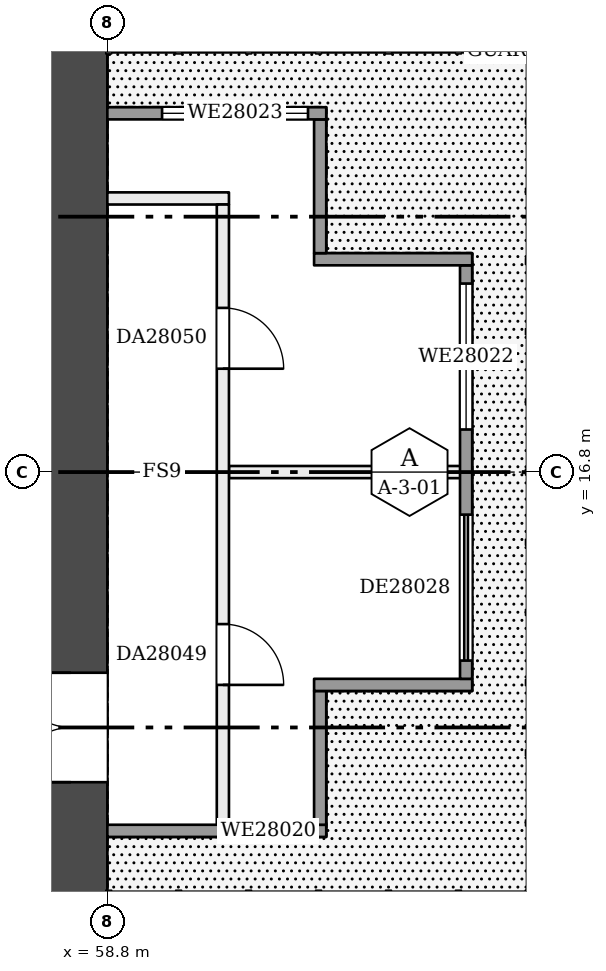
"""IFC4 building model, lengths in metres.
Left out: names, types, materials, properties, quantities, classifications, styles, units other than length and angle.
Written with IfcOpenShell. Run it as: python <this file> out.ifc"""

import sys

from ifc_helpers import new_model, si_unit, direction, frame, frame_2d, origin, place, context, subcontext, project, spatial, rectangle, extrude, element, fill, save


model = new_model("IFC4")
c1 = context("Model", 3, precision=1e-05, world=origin(), true_north=direction((0.0, 1.0)))
c2 = subcontext(c1, "Body", "Model", "MODEL_VIEW")
j1 = project(units=[si_unit("LENGTHUNIT", "METRE"), si_unit("PLANEANGLEUNIT", "RADIAN")], contexts=[c1])
p1 = place(None, origin())
s1 = spatial("IfcSite", under=j1, at=p1, CompositionType="ELEMENT")
p2 = place(p1, origin())
s2 = spatial("IfcBuilding", under=s1, at=p2, CompositionType="ELEMENT")
p3 = place(p2, frame((0.0, 0.0, 112.7)))
s3 = spatial("IfcBuildingStorey", under=s2, at=p3, CompositionType="ELEMENT", Elevation=112.7)
p4 = place(p3, frame((58.2, 9.6, 0.0), z_axis=(0.0, 0.0, 1.0), x_axis=(0.0, 1.0, 0.0)))
e1 = element("IfcWall", 1, at=p4, inside=s3, PredefinedType="SHEAR", context=c2, shape_type="SweptSolid", body=[
    extrude(rectangle(XDim=14.4, YDim=1.2, at=frame_2d((7.2, 0.0))), origin(), (0.0, 0.0, 1.0), 3.22),
])
p5 = place(p4, frame((2.1, 0.0, 0.0)))
e2 = element("IfcOpeningElement", 2, at=p5, cuts=e1, PredefinedType="OPENING", context=c2, shape_type="SweptSolid", body=[
    extrude(rectangle(XDim=1.8, YDim=2.1, at=frame_2d((0.9, 1.05))), frame((0.0, 0.61, 0.0), z_axis=(0.0, -1.0, 0.0), x_axis=(1.0, 0.0, 0.0)), (0.0, 0.0, 1.0), 1.22),
])
p6 = place(p3, frame((60.8, 16.8, 0.0), z_axis=(0.0, 0.0, 1.0), x_axis=(1.0, 0.0, 0.0)))
e3 = element("IfcWall", 3, at=p6, inside=s3, PredefinedType="PARTITIONING", context=c2, shape_type="SweptSolid", body=[
    extrude(rectangle(XDim=3.9, YDim=0.2, at=frame_2d((1.95, 0.0))), origin(), (0.0, 0.0, 1.0), 3.22),
])
p7 = place(p3, frame((58.8, 21.3, 0.0), z_axis=(0.0, 0.0, 1.0), x_axis=(1.0, 0.0, 0.0)))
e4 = element("IfcWall", 4, at=p7, inside=s3, PredefinedType="PARTITIONING", context=c2, shape_type="SweptSolid", body=[
    extrude(rectangle(XDim=2.0, YDim=0.2, at=frame_2d((1.0, 0.0))), origin(), (0.0, 0.0, 1.0), 3.22),
])
p8 = place(p3, frame((60.7, 10.9, 0.0), z_axis=(0.0, 0.0, 1.0), x_axis=(0.0, 1.0, 0.0)))
e5 = element("IfcWall", 5, at=p8, inside=s3, PredefinedType="PARTITIONING", context=c2, shape_type="SweptSolid", body=[
    extrude(rectangle(XDim=10.3, YDim=0.2, at=frame_2d((5.15, 0.0))), origin(), (0.0, 0.0, 1.0), 3.22),
])
p9 = place(p8, frame((2.4, 0.0, 0.0)))
e6 = element("IfcOpeningElement", 6, at=p9, cuts=e5, PredefinedType="OPENING", context=c2, shape_type="SweptSolid", body=[
    extrude(rectangle(XDim=1.0, YDim=2.1, at=frame_2d((0.5, 1.05))), frame((0.0, 0.11, 0.0), z_axis=(0.0, -1.0, 0.0), x_axis=(1.0, 0.0, 0.0)), (0.0, 0.0, 1.0), 0.22),
])
p10 = place(p8, frame((7.6, 0.0, 0.0)))
e7 = element("IfcOpeningElement", 7, at=p10, cuts=e5, PredefinedType="OPENING", context=c2, shape_type="SweptSolid", body=[
    extrude(rectangle(XDim=1.0, YDim=2.1, at=frame_2d((0.5, 1.05))), frame((0.0, 0.11, 0.0), z_axis=(0.0, -1.0, 0.0), x_axis=(1.0, 0.0, 0.0)), (0.0, 0.0, 1.0), 0.22),
])
p11 = place(p3, frame((58.8, 10.9, 0.0), z_axis=(0.0, 0.0, 1.0), x_axis=(1.0, 0.0, 0.0)))
e8 = element("IfcWall", 8, at=p11, inside=s3, PredefinedType="SOLIDWALL", context=c2, shape_type="SweptSolid", body=[
    extrude(rectangle(XDim=3.6, YDim=0.2, at=frame_2d((1.8, 0.0))), origin(), (0.0, 0.0, 1.0), 3.22),
])
p12 = place(p11, frame((2.0, 0.0, 0.9)))
e9 = element("IfcOpeningElement", 9, at=p12, cuts=e8, PredefinedType="OPENING", context=c2, shape_type="SweptSolid", body=[
    extrude(rectangle(XDim=1.3, YDim=1.5, at=frame_2d((0.65, 0.75))), frame((0.0, 0.11, 0.0), z_axis=(0.0, -1.0, 0.0), x_axis=(1.0, 0.0, 0.0)), (0.0, 0.0, 1.0), 0.22),
])
p13 = place(p3, frame((62.3, 11.0, 0.0), z_axis=(0.0, 0.0, 1.0), x_axis=(0.0, 1.0, 0.0)))
e10 = element("IfcWall", 10, at=p13, inside=s3, PredefinedType="SOLIDWALL", context=c2, shape_type="SweptSolid", body=[
    extrude(rectangle(XDim=2.2, YDim=0.2, at=frame_2d((1.1, 0.0))), origin(), (0.0, 0.0, 1.0), 3.22),
])
p14 = place(p3, frame((62.2, 13.3, 0.0), z_axis=(0.0, 0.0, 1.0), x_axis=(1.0, 0.0, 0.0)))
e11 = element("IfcWall", 11, at=p14, inside=s3, PredefinedType="SOLIDWALL", context=c2, shape_type="SweptSolid", body=[
    extrude(rectangle(XDim=2.6, YDim=0.2, at=frame_2d((1.3, 0.0))), origin(), (0.0, 0.0, 1.0), 3.22),
])
p15 = place(p3, frame((64.7, 13.4, 0.0), z_axis=(0.0, 0.0, 1.0), x_axis=(0.0, 1.0, 0.0)))
e12 = element("IfcWall", 12, at=p15, inside=s3, PredefinedType="SOLIDWALL", context=c2, shape_type="SweptSolid", body=[
    extrude(rectangle(XDim=6.8, YDim=0.2, at=frame_2d((3.4, 0.0))), origin(), (0.0, 0.0, 1.0), 3.22),
])
p16 = place(p15, frame((4.1, 0.0, 0.9)))
e13 = element("IfcOpeningElement", 13, at=p16, cuts=e12, PredefinedType="OPENING", context=c2, shape_type="SweptSolid", body=[
    extrude(rectangle(XDim=2.4, YDim=1.5, at=frame_2d((1.2, 0.75))), frame((0.0, 0.11, 0.0), z_axis=(0.0, -1.0, 0.0), x_axis=(1.0, 0.0, 0.0)), (0.0, 0.0, 1.0), 0.22),
])
p17 = place(p15, frame((0.3, 0.0, 0.0)))
e14 = element("IfcOpeningElement", 14, at=p17, cuts=e12, PredefinedType="OPENING", context=c2, shape_type="SweptSolid", body=[
    extrude(rectangle(XDim=2.4, YDim=2.2, at=frame_2d((1.2, 1.1))), frame((0.0, 0.11, 0.0), z_axis=(0.0, -1.0, 0.0), x_axis=(1.0, 0.0, 0.0)), (0.0, 0.0, 1.0), 0.22),
])
p18 = place(p3, frame((64.8, 20.3, 0.0), z_axis=(0.0, 0.0, 1.0), x_axis=(-1.0, 0.0, 0.0)))
e15 = element("IfcWall", 15, at=p18, inside=s3, PredefinedType="SOLIDWALL", context=c2, shape_type="SweptSolid", body=[
    extrude(rectangle(XDim=2.6, YDim=0.2, at=frame_2d((1.3, 0.0))), origin(), (0.0, 0.0, 1.0), 3.22),
])
p19 = place(p3, frame((62.3, 20.4, 0.0), z_axis=(0.0, 0.0, 1.0), x_axis=(0.0, 1.0, 0.0)))
e16 = element("IfcWall", 16, at=p19, inside=s3, PredefinedType="SOLIDWALL", context=c2, shape_type="SweptSolid", body=[
    extrude(rectangle(XDim=2.2, YDim=0.2, at=frame_2d((1.1, 0.0))), origin(), (0.0, 0.0, 1.0), 3.22),
])
p20 = place(p3, frame((62.4, 22.7, 0.0), z_axis=(0.0, 0.0, 1.0), x_axis=(-1.0, 0.0, 0.0)))
e17 = element("IfcWall", 17, at=p20, inside=s3, PredefinedType="SOLIDWALL", context=c2, shape_type="SweptSolid", body=[
    extrude(rectangle(XDim=3.6, YDim=0.2, at=frame_2d((1.8, 0.0))), origin(), (0.0, 0.0, 1.0), 3.22),
])
p21 = place(p20, frame((0.3, 0.0, 0.9)))
e18 = element("IfcOpeningElement", 18, at=p21, cuts=e17, PredefinedType="OPENING", context=c2, shape_type="SweptSolid", body=[
    extrude(rectangle(XDim=2.4, YDim=1.5, at=frame_2d((1.2, 0.75))), frame((0.0, 0.11, 0.0), z_axis=(0.0, -1.0, 0.0), x_axis=(1.0, 0.0, 0.0)), (0.0, 0.0, 1.0), 0.22),
])
p22 = place(p5, origin())
e19 = element("IfcDoor", 19, at=p22, inside=s3, OperationType="DOUBLE_DOOR_SINGLE_SWING", PredefinedType="DOOR", context=c2, shape_type="SweptSolid", body=[
    extrude(rectangle(XDim=1.8, YDim=2.1, at=frame_2d((0.9, 1.05))), frame((0.0, 0.025, 0.0), z_axis=(0.0, -1.0, 0.0), x_axis=(1.0, 0.0, 0.0)), (0.0, 0.0, 1.0), 0.05),
])
fill(e2, e19)
p23 = place(p9, frame((1.0, 0.0, 0.0), z_axis=(0.0, 0.0, 1.0), x_axis=(-1.0, 0.0, 0.0)))
e20 = element("IfcDoor", 20, at=p23, inside=s3, OperationType="SINGLE_SWING_RIGHT", PredefinedType="DOOR", context=c2, shape_type="SweptSolid", body=[
    extrude(rectangle(XDim=1.0, YDim=2.1, at=frame_2d((0.5, 1.05))), frame((0.0, 0.025, 0.0), z_axis=(0.0, -1.0, 0.0), x_axis=(1.0, 0.0, 0.0)), (0.0, 0.0, 1.0), 0.05),
])
fill(e6, e20)
p24 = place(p10, frame((1.0, 0.0, 0.0), z_axis=(0.0, 0.0, 1.0), x_axis=(-1.0, 0.0, 0.0)))
e21 = element("IfcDoor", 21, at=p24, inside=s3, OperationType="SINGLE_SWING_RIGHT", PredefinedType="DOOR", context=c2, shape_type="SweptSolid", body=[
    extrude(rectangle(XDim=1.0, YDim=2.1, at=frame_2d((0.5, 1.05))), frame((0.0, 0.025, 0.0), z_axis=(0.0, -1.0, 0.0), x_axis=(1.0, 0.0, 0.0)), (0.0, 0.0, 1.0), 0.05),
])
fill(e7, e21)
p25 = place(p12, origin())
e22 = element("IfcWindow", 22, at=p25, inside=s3, PartitioningType="SINGLE_PANEL", PredefinedType="WINDOW", context=c2, shape_type="SweptSolid", body=[
    extrude(rectangle(XDim=1.3, YDim=1.5, at=frame_2d((0.65, 0.75))), frame((0.0, 0.03, 0.0), z_axis=(0.0, -1.0, 0.0), x_axis=(1.0, 0.0, 0.0)), (0.0, 0.0, 1.0), 0.06),
])
fill(e9, e22)
p26 = place(p16, origin())
e23 = element("IfcWindow", 23, at=p26, inside=s3, PartitioningType="SINGLE_PANEL", PredefinedType="WINDOW", context=c2, shape_type="SweptSolid", body=[
    extrude(rectangle(XDim=2.4, YDim=1.5, at=frame_2d((1.2, 0.75))), frame((0.0, 0.03, 0.0), z_axis=(0.0, -1.0, 0.0), x_axis=(1.0, 0.0, 0.0)), (0.0, 0.0, 1.0), 0.06),
])
fill(e13, e23)
p27 = place(p21, origin())
e24 = element("IfcWindow", 24, at=p27, inside=s3, PartitioningType="SINGLE_PANEL", PredefinedType="WINDOW", context=c2, shape_type="SweptSolid", body=[
    extrude(rectangle(XDim=2.4, YDim=1.5, at=frame_2d((1.2, 0.75))), frame((0.0, 0.03, 0.0), z_axis=(0.0, -1.0, 0.0), x_axis=(1.0, 0.0, 0.0)), (0.0, 0.0, 1.0), 0.06),
])
fill(e18, e24)
p28 = place(p17, origin())
e25 = element("IfcDoor", 25, at=p28, inside=s3, OperationType="DOUBLE_DOOR_SLIDING", PredefinedType="DOOR", context=c2, shape_type="SweptSolid", body=[
    extrude(rectangle(XDim=2.4, YDim=2.2, at=frame_2d((1.2, 1.1))), frame((0.0, 0.025, 0.0), z_axis=(0.0, -1.0, 0.0), x_axis=(1.0, 0.0, 0.0)), (0.0, 0.0, 1.0), 0.05),
])
fill(e14, e25)
save(model, sys.argv[1])
